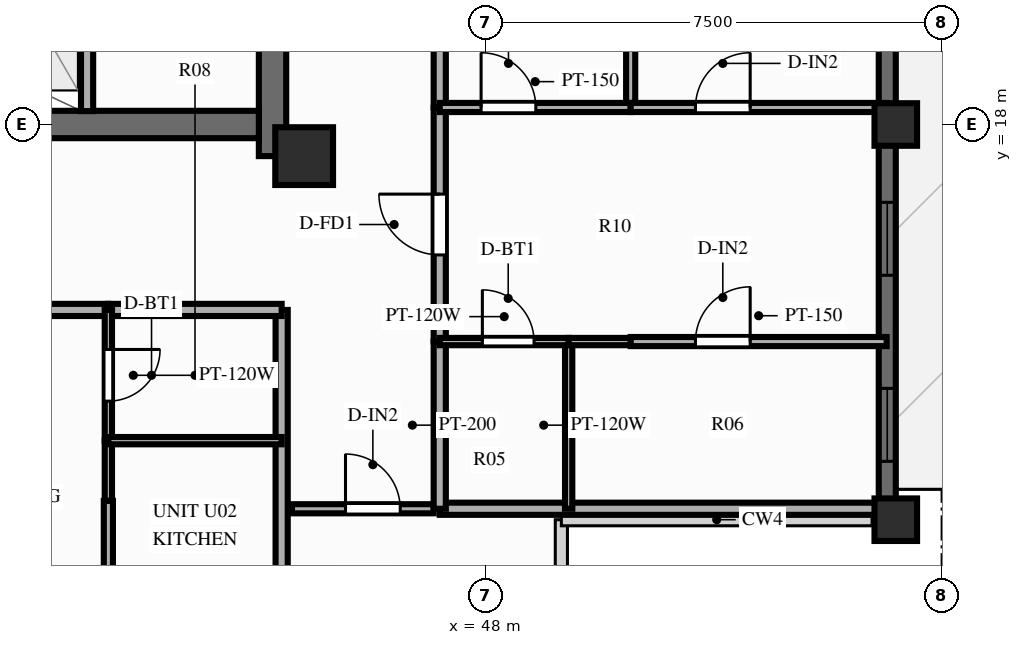
"""IFC4 building model, lengths in metres.
Left out: names, types, materials, properties, quantities, classifications, styles, units other than length and angle.
Written with IfcOpenShell. Run it as: python <this file> out.ifc"""

import sys

from ifc_helpers import new_model, si_unit, direction, frame, frame_2d, origin, origin_2d, place, context, subcontext, project, spatial, rectangle, extrude, source, transform, mapped, element, fill, save


model = new_model("IFC4")
c1 = context("Model", 3, precision=1e-05, world=origin(), true_north=direction((0.0, 1.0)))
c2 = subcontext(c1, "Body", "Model", "MODEL_VIEW")
j1 = project(units=[si_unit("LENGTHUNIT", "METRE"), si_unit("PLANEANGLEUNIT", "RADIAN")], contexts=[c1])
p1 = place(None, origin())
s1 = spatial("IfcSite", under=j1, at=p1, CompositionType="ELEMENT")
p2 = place(p1, origin())
s2 = spatial("IfcBuilding", under=s1, at=p2, CompositionType="ELEMENT")
p3 = place(p2, frame((0.0, 0.0, 236.1)))
s3 = spatial("IfcBuildingStorey", under=s2, at=p3, CompositionType="ELEMENT", Elevation=236.1)
p4 = place(p3, frame((44.5, 17.48, 0.0), z_axis=(0.0, 0.0, 1.0), x_axis=(0.0, 1.0, 0.0)))
e1 = element("IfcWall", 1, at=p4, inside=s3, PredefinedType="SHEAR", context=c2, shape_type="SweptSolid", body=[
    extrude(rectangle(XDim=19.04, YDim=0.45, at=frame_2d((9.52, 0.0))), origin(), (0.0, 0.0, 1.0), 3.9),
])
p5 = place(p4, frame((12.67, 0.0, 0.0), z_axis=(0.0, 0.0, 1.0), x_axis=(-1.0, 0.0, 0.0)))
e2 = element("IfcOpeningElement", 2, at=p5, cuts=e1, PredefinedType="OPENING", context=c2, shape_type="SweptSolid", body=[
    extrude(rectangle(XDim=1.1, YDim=2.15, at=frame_2d((0.55, 1.075))), frame((0.0, 0.237, 0.0), z_axis=(0.0, -1.0, 0.0), x_axis=(1.0, 0.0, 0.0)), (0.0, 0.0, 1.0), 0.474),
])
p6 = place(p3, frame((31.725, 18.0, 0.0), z_axis=(0.0, 0.0, 1.0), x_axis=(1.0, 0.0, 0.0)))
e3 = element("IfcWall", 3, at=p6, inside=s3, PredefinedType="SHEAR", context=c2, shape_type="SweptSolid", body=[
    extrude(rectangle(XDim=12.55, YDim=0.45, at=frame_2d((6.275, 0.0))), origin(), (0.0, 0.0, 1.0), 3.9),
])
m1 = source(origin(), c2, "Body", "SweptSolid", [
    extrude(rectangle(XDim=0.95, YDim=0.95, at=origin_2d()), origin(), (0.0, 0.0, 1.0), 3.9),
])
p7 = place(p3, frame((45.02, 17.48, 0.0), z_axis=(0.0, 0.0, 1.0), x_axis=(1.0, 0.0, 0.0)))
e4 = element("IfcColumn", 4, at=p7, inside=s3, PredefinedType="COLUMN", context=c2, shape_type="MappedRepresentation", body=[
    mapped(m1, transform((0.0, 0.0, 0.0), scale=1.0)),
])
m2 = source(origin(), c2, "Body", "SweptSolid", [
    extrude(rectangle(XDim=0.7, YDim=0.7, at=origin_2d()), origin(), (0.0, 0.0, 1.0), 3.9),
])
for number, where, z_axis, x_axis in (
    (5, (54.75, 11.5, 0.0), (0.0, 0.0, 1.0), (1.0, 0.0, 0.0)),
    (6, (54.75, 18.0, 0.0), (0.0, 0.0, 1.0), (1.0, 0.0, 0.0)),
):
    element("IfcColumn", number, at=place(p3, frame(where, z_axis=z_axis, x_axis=x_axis)), inside=s3, PredefinedType="COLUMN", context=c2, shape_type="MappedRepresentation", body=[
        mapped(m2, transform((0.0, 0.0, 0.0), scale=1.0)),
    ])
p8 = place(p3, frame((54.61, 11.5, 0.0), z_axis=(0.0, 0.0, 1.0), x_axis=(0.0, 1.0, 0.0)))
e7 = element("IfcWall", 7, at=p8, inside=s3, PredefinedType="SOLIDWALL", context=c2, shape_type="SweptSolid", body=[
    extrude(rectangle(XDim=31.0, YDim=0.28, at=frame_2d((15.5, 0.0))), origin(), (0.0, 0.0, 1.0), 2.44),
])
p9 = place(p8, frame((0.96, 0.0, 0.25)))
e8 = element("IfcOpeningElement", 8, at=p9, cuts=e7, PredefinedType="OPENING", context=c2, shape_type="SweptSolid", body=[
    extrude(rectangle(XDim=1.2, YDim=1.5, at=frame_2d((0.6, 0.75))), frame((0.0, 0.152, 0.0), z_axis=(0.0, -1.0, 0.0), x_axis=(1.0, 0.0, 0.0)), (0.0, 0.0, 1.0), 0.304),
])
p10 = place(p8, frame((4.02, 0.0, 0.25)))
e9 = element("IfcOpeningElement", 9, at=p10, cuts=e7, PredefinedType="OPENING", context=c2, shape_type="SweptSolid", body=[
    extrude(rectangle(XDim=1.2, YDim=1.5, at=frame_2d((0.6, 0.75))), frame((0.0, 0.152, 0.0), z_axis=(0.0, -1.0, 0.0), x_axis=(1.0, 0.0, 0.0)), (0.0, 0.0, 1.0), 0.304),
])
p11 = place(p8, frame((8.089, 0.0, 0.25)))
e10 = element("IfcOpeningElement", 10, at=p11, cuts=e7, PredefinedType="OPENING", context=c2, shape_type="SweptSolid", body=[
    extrude(rectangle(XDim=1.2, YDim=1.5, at=frame_2d((0.6, 0.75))), frame((0.0, 0.152, 0.0), z_axis=(0.0, -1.0, 0.0), x_axis=(1.0, 0.0, 0.0)), (0.0, 0.0, 1.0), 0.304),
])
p12 = place(p8, frame((11.373, 0.0, 0.25)))
e11 = element("IfcOpeningElement", 11, at=p12, cuts=e7, PredefinedType="OPENING", context=c2, shape_type="SweptSolid", body=[
    extrude(rectangle(XDim=1.2, YDim=1.5, at=frame_2d((0.6, 0.75))), frame((0.0, 0.152, 0.0), z_axis=(0.0, -1.0, 0.0), x_axis=(1.0, 0.0, 0.0)), (0.0, 0.0, 1.0), 0.304),
])
p13 = place(p8, frame((15.907, 0.0, 0.0), z_axis=(0.0, 0.0, 1.0), x_axis=(-1.0, 0.0, 0.0)))
e12 = element("IfcOpeningElement", 12, at=p13, cuts=e7, PredefinedType="OPENING", context=c2, shape_type="SweptSolid", body=[
    extrude(rectangle(XDim=1.6, YDim=2.15, at=frame_2d((0.8, 1.075))), frame((0.0, 0.152, 0.0), z_axis=(0.0, -1.0, 0.0), x_axis=(1.0, 0.0, 0.0)), (0.0, 0.0, 1.0), 0.304),
])
p14 = place(p8, frame((18.188, 0.0, 0.25)))
e13 = element("IfcOpeningElement", 13, at=p14, cuts=e7, PredefinedType="OPENING", context=c2, shape_type="SweptSolid", body=[
    extrude(rectangle(XDim=1.2, YDim=1.5, at=frame_2d((0.6, 0.75))), frame((0.0, 0.152, 0.0), z_axis=(0.0, -1.0, 0.0), x_axis=(1.0, 0.0, 0.0)), (0.0, 0.0, 1.0), 0.304),
])
p15 = place(p8, frame((21.484, 0.0, 0.25)))
e14 = element("IfcOpeningElement", 14, at=p15, cuts=e7, PredefinedType="OPENING", context=c2, shape_type="SweptSolid", body=[
    extrude(rectangle(XDim=1.2, YDim=1.5, at=frame_2d((0.6, 0.75))), frame((0.0, 0.152, 0.0), z_axis=(0.0, -1.0, 0.0), x_axis=(1.0, 0.0, 0.0)), (0.0, 0.0, 1.0), 0.304),
])
p16 = place(p8, frame((25.234, 0.0, 0.25)))
e15 = element("IfcOpeningElement", 15, at=p16, cuts=e7, PredefinedType="OPENING", context=c2, shape_type="SweptSolid", body=[
    extrude(rectangle(XDim=1.2, YDim=1.5, at=frame_2d((0.6, 0.75))), frame((0.0, 0.152, 0.0), z_axis=(0.0, -1.0, 0.0), x_axis=(1.0, 0.0, 0.0)), (0.0, 0.0, 1.0), 0.304),
])
p17 = place(p8, frame((28.294, 0.0, 0.25)))
e16 = element("IfcOpeningElement", 16, at=p17, cuts=e7, PredefinedType="OPENING", context=c2, shape_type="SweptSolid", body=[
    extrude(rectangle(XDim=1.2, YDim=1.5, at=frame_2d((0.6, 0.75))), frame((0.0, 0.152, 0.0), z_axis=(0.0, -1.0, 0.0), x_axis=(1.0, 0.0, 0.0)), (0.0, 0.0, 1.0), 0.304),
])
p18 = place(p3, frame((41.45, 18.22, 0.0), z_axis=(0.0, 0.0, 1.0), x_axis=(0.0, 1.0, 0.0)))
e17 = element("IfcWall", 17, at=p18, inside=s3, PredefinedType="PARTITIONING", context=c2, shape_type="SweptSolid", body=[
    extrude(rectangle(XDim=2.96, YDim=0.2, at=frame_2d((1.48, 0.0))), origin(), (0.0, 0.0, 1.0), 3.56),
])
p19 = place(p3, frame((44.82, 11.68, 0.0), z_axis=(0.0, 0.0, 1.0), x_axis=(1.0, 0.0, 0.0)))
e18 = element("IfcWall", 18, at=p19, inside=s3, PredefinedType="PARTITIONING", context=c2, shape_type="SweptSolid", body=[
    extrude(rectangle(XDim=2.33, YDim=0.15, at=frame_2d((1.165, 0.0))), origin(), (0.0, 0.0, 1.0), 2.24),
])
p20 = place(p19, frame((0.88, 0.0, 0.0)))
e19 = element("IfcOpeningElement", 19, at=p20, cuts=e18, PredefinedType="OPENING", context=c2, shape_type="SweptSolid", body=[
    extrude(rectangle(XDim=0.9, YDim=2.1, at=frame_2d((0.45, 1.05))), frame((0.0, 0.087, 0.0), z_axis=(0.0, -1.0, 0.0), x_axis=(1.0, 0.0, 0.0)), (0.0, 0.0, 1.0), 0.174),
])
p21 = place(p3, frame((44.65, 14.95, 0.0), z_axis=(0.0, 0.0, 1.0), x_axis=(0.0, -1.0, 0.0)))
e20 = element("IfcWall", 20, at=p21, inside=s3, PredefinedType="PARTITIONING", context=c2, shape_type="SweptSolid", body=[
    extrude(rectangle(XDim=8.8, YDim=0.2, at=frame_2d((4.4, 0.0))), origin(), (0.0, 0.0, 1.0), 2.44),
])
p22 = place(p3, frame((38.0, 14.95, 0.0), z_axis=(0.0, 0.0, 1.0), x_axis=(1.0, 0.0, 0.0)))
e21 = element("IfcWall", 21, at=p22, inside=s3, PredefinedType="PARTITIONING", context=c2, shape_type="SweptSolid", body=[
    extrude(rectangle(XDim=3.8, YDim=0.2, at=frame_2d((1.9, 0.0))), origin(), (0.0, 0.0, 1.0), 3.56),
])
p23 = place(p22, frame((1.4, 0.0, 0.0)))
e22 = element("IfcOpeningElement", 22, at=p23, cuts=e21, PredefinedType="OPENING", context=c2, shape_type="SweptSolid", body=[
    extrude(rectangle(XDim=1.0, YDim=2.15, at=frame_2d((0.5, 1.075))), frame((0.0, 0.112, 0.0), z_axis=(0.0, -1.0, 0.0), x_axis=(1.0, 0.0, 0.0)), (0.0, 0.0, 1.0), 0.224),
])
p24 = place(p3, frame((41.8, 14.95, 0.0), z_axis=(0.0, 0.0, 1.0), x_axis=(1.0, 0.0, 0.0)))
e23 = element("IfcWall", 23, at=p24, inside=s3, PredefinedType="PARTITIONING", context=c2, shape_type="SweptSolid", body=[
    extrude(rectangle(XDim=2.85, YDim=0.2, at=frame_2d((1.425, 0.0))), origin(), (0.0, 0.0, 1.0), 3.56),
])
p25 = place(p3, frame((41.8, 14.95, 0.0), z_axis=(0.0, 0.0, 1.0), x_axis=(0.0, -1.0, 0.0)))
e24 = element("IfcWall", 24, at=p25, inside=s3, PredefinedType="PARTITIONING", context=c2, shape_type="SweptSolid", body=[
    extrude(rectangle(XDim=2.15, YDim=0.12, at=frame_2d((1.075, 0.0))), origin(), (0.0, 0.0, 1.0), 3.56),
])
p26 = place(p25, frame((0.65, 0.0, 0.0)))
e25 = element("IfcOpeningElement", 25, at=p26, cuts=e24, PredefinedType="OPENING", context=c2, shape_type="SweptSolid", body=[
    extrude(rectangle(XDim=0.85, YDim=2.05, at=frame_2d((0.425, 1.025))), frame((0.0, 0.072, 0.0), z_axis=(0.0, -1.0, 0.0), x_axis=(1.0, 0.0, 0.0)), (0.0, 0.0, 1.0), 0.144),
])
p27 = place(p3, frame((41.8, 12.8, 0.0), z_axis=(0.0, 0.0, 1.0), x_axis=(0.0, -1.0, 0.0)))
e26 = element("IfcWall", 26, at=p27, inside=s3, PredefinedType="PARTITIONING", context=c2, shape_type="SweptSolid", body=[
    extrude(rectangle(XDim=0.99, YDim=0.12, at=frame_2d((0.495, 0.0))), origin(), (0.0, 0.0, 1.0), 3.56),
])
p28 = place(p3, frame((41.8, 12.8, 0.0), z_axis=(0.0, 0.0, 1.0), x_axis=(1.0, 0.0, 0.0)))
e27 = element("IfcWall", 27, at=p28, inside=s3, PredefinedType="PARTITIONING", context=c2, shape_type="SweptSolid", body=[
    extrude(rectangle(XDim=2.85, YDim=0.12, at=frame_2d((1.425, 0.0))), origin(), (0.0, 0.0, 1.0), 3.56),
])
p29 = place(p3, frame((41.8, 11.81, 0.0), z_axis=(0.0, 0.0, 1.0), x_axis=(0.0, -1.0, 0.0)))
e28 = element("IfcWall", 28, at=p29, inside=s3, PredefinedType="PARTITIONING", context=c2, shape_type="SweptSolid", body=[
    extrude(rectangle(XDim=5.66, YDim=0.15, at=frame_2d((2.83, 0.0))), origin(), (0.0, 0.0, 1.0), 3.56),
])
p30 = place(p29, frame((2.202, 0.0, 0.0)))
e29 = element("IfcOpeningElement", 29, at=p30, cuts=e28, PredefinedType="OPENING", context=c2, shape_type="SweptSolid", body=[
    extrude(rectangle(XDim=0.9, YDim=2.1, at=frame_2d((0.45, 1.05))), frame((0.0, 0.087, 0.0), z_axis=(0.0, -1.0, 0.0), x_axis=(1.0, 0.0, 0.0)), (0.0, 0.0, 1.0), 0.174),
])
p31 = place(p3, frame((47.25, 11.68, 0.0), z_axis=(0.0, 0.0, 1.0), x_axis=(1.0, 0.0, 0.0)))
e30 = element("IfcWall", 30, at=p31, inside=s3, PredefinedType="PARTITIONING", context=c2, shape_type="SweptSolid", body=[
    extrude(rectangle(XDim=7.35, YDim=0.2, at=frame_2d((3.675, 0.0))), origin(), (0.0, 0.0, 1.0), 2.24),
])
p32 = place(p3, frame((47.25, 11.68, 0.0), z_axis=(0.0, 0.0, 1.0), x_axis=(0.0, 1.0, 0.0)))
e31 = element("IfcWall", 31, at=p32, inside=s3, PredefinedType="PARTITIONING", context=c2, shape_type="SweptSolid", body=[
    extrude(rectangle(XDim=2.75, YDim=0.2, at=frame_2d((1.375, 0.0))), origin(), (0.0, 0.0, 1.0), 2.24),
])
p33 = place(p3, frame((47.25, 14.43, 0.0), z_axis=(0.0, 0.0, 1.0), x_axis=(0.0, 1.0, 0.0)))
e32 = element("IfcWall", 32, at=p33, inside=s3, PredefinedType="PARTITIONING", context=c2, shape_type="SweptSolid", body=[
    extrude(rectangle(XDim=3.85, YDim=0.2, at=frame_2d((1.925, 0.0))), origin(), (0.0, 0.0, 1.0), 2.24),
])
p34 = place(p33, frame((1.425, 0.0, 0.0)))
e33 = element("IfcOpeningElement", 33, at=p34, cuts=e32, PredefinedType="OPENING", context=c2, shape_type="SweptSolid", body=[
    extrude(rectangle(XDim=1.0, YDim=2.15, at=frame_2d((0.5, 1.075))), frame((0.0, 0.112, 0.0), z_axis=(0.0, -1.0, 0.0), x_axis=(1.0, 0.0, 0.0)), (0.0, 0.0, 1.0), 0.224),
])
p35 = place(p3, frame((47.25, 18.28, 0.0), z_axis=(0.0, 0.0, 1.0), x_axis=(0.0, 1.0, 0.0)))
e34 = element("IfcWall", 34, at=p35, inside=s3, PredefinedType="PARTITIONING", context=c2, shape_type="SweptSolid", body=[
    extrude(rectangle(XDim=3.818, YDim=0.2, at=frame_2d((1.909, 0.0))), origin(), (0.0, 0.0, 1.0), 3.56),
])
p36 = place(p3, frame((49.37, 11.68, 0.0), z_axis=(0.0, 0.0, 1.0), x_axis=(0.0, 1.0, 0.0)))
e35 = element("IfcWall", 35, at=p36, inside=s3, PredefinedType="PARTITIONING", context=c2, shape_type="SweptSolid", body=[
    extrude(rectangle(XDim=2.75, YDim=0.12, at=frame_2d((1.375, 0.0))), origin(), (0.0, 0.0, 1.0), 3.56),
])
p37 = place(p3, frame((50.39, 18.28, 0.0), z_axis=(0.0, 0.0, 1.0), x_axis=(0.0, 1.0, 0.0)))
e36 = element("IfcWall", 36, at=p37, inside=s3, PredefinedType="PARTITIONING", context=c2, shape_type="SweptSolid", body=[
    extrude(rectangle(XDim=3.818, YDim=0.15, at=frame_2d((1.909, 0.0))), origin(), (0.0, 0.0, 1.0), 3.39),
])
p38 = place(p3, frame((47.25, 14.43, 0.0), z_axis=(0.0, 0.0, 1.0), x_axis=(1.0, 0.0, 0.0)))
e37 = element("IfcWall", 37, at=p38, inside=s3, PredefinedType="PARTITIONING", context=c2, shape_type="SweptSolid", body=[
    extrude(rectangle(XDim=2.12, YDim=0.12, at=frame_2d((1.06, 0.0))), origin(), (0.0, 0.0, 1.0), 3.56),
])
p39 = place(p38, frame((0.701, 0.0, 0.0)))
e38 = element("IfcOpeningElement", 38, at=p39, cuts=e37, PredefinedType="OPENING", context=c2, shape_type="SweptSolid", body=[
    extrude(rectangle(XDim=0.85, YDim=2.05, at=frame_2d((0.425, 1.025))), frame((0.0, 0.072, 0.0), z_axis=(0.0, -1.0, 0.0), x_axis=(1.0, 0.0, 0.0)), (0.0, 0.0, 1.0), 0.144),
])
p40 = place(p3, frame((49.37, 14.43, 0.0), z_axis=(0.0, 0.0, 1.0), x_axis=(1.0, 0.0, 0.0)))
e39 = element("IfcWall", 39, at=p40, inside=s3, PredefinedType="PARTITIONING", context=c2, shape_type="SweptSolid", body=[
    extrude(rectangle(XDim=1.02, YDim=0.12, at=frame_2d((0.51, 0.0))), origin(), (0.0, 0.0, 1.0), 3.56),
])
p41 = place(p3, frame((50.39, 14.43, 0.0), z_axis=(0.0, 0.0, 1.0), x_axis=(1.0, 0.0, 0.0)))
e40 = element("IfcWall", 40, at=p41, inside=s3, PredefinedType="PARTITIONING", context=c2, shape_type="SweptSolid", body=[
    extrude(rectangle(XDim=4.21, YDim=0.15, at=frame_2d((2.105, 0.0))), origin(), (0.0, 0.0, 1.0), 3.56),
])
p42 = place(p41, frame((1.065, 0.0, 0.0)))
e41 = element("IfcOpeningElement", 41, at=p42, cuts=e40, PredefinedType="OPENING", context=c2, shape_type="SweptSolid", body=[
    extrude(rectangle(XDim=0.9, YDim=2.1, at=frame_2d((0.45, 1.05))), frame((0.0, 0.087, 0.0), z_axis=(0.0, -1.0, 0.0), x_axis=(1.0, 0.0, 0.0)), (0.0, 0.0, 1.0), 0.174),
])
p43 = place(p3, frame((47.25, 18.28, 0.0), z_axis=(0.0, 0.0, 1.0), x_axis=(1.0, 0.0, 0.0)))
e42 = element("IfcWall", 42, at=p43, inside=s3, PredefinedType="PARTITIONING", context=c2, shape_type="SweptSolid", body=[
    extrude(rectangle(XDim=3.14, YDim=0.15, at=frame_2d((1.57, 0.0))), origin(), (0.0, 0.0, 1.0), 3.56),
])
p44 = place(p43, frame((0.68, 0.0, 0.0)))
e43 = element("IfcOpeningElement", 43, at=p44, cuts=e42, PredefinedType="OPENING", context=c2, shape_type="SweptSolid", body=[
    extrude(rectangle(XDim=0.9, YDim=2.1, at=frame_2d((0.45, 1.05))), frame((0.0, 0.087, 0.0), z_axis=(0.0, -1.0, 0.0), x_axis=(1.0, 0.0, 0.0)), (0.0, 0.0, 1.0), 0.174),
])
p45 = place(p3, frame((50.39, 18.28, 0.0), z_axis=(0.0, 0.0, 1.0), x_axis=(1.0, 0.0, 0.0)))
e44 = element("IfcWall", 44, at=p45, inside=s3, PredefinedType="PARTITIONING", context=c2, shape_type="SweptSolid", body=[
    extrude(rectangle(XDim=4.21, YDim=0.15, at=frame_2d((2.105, 0.0))), origin(), (0.0, 0.0, 1.0), 3.56),
])
p46 = place(p45, frame((1.065, 0.0, 0.0)))
e45 = element("IfcOpeningElement", 45, at=p46, cuts=e44, PredefinedType="OPENING", context=c2, shape_type="SweptSolid", body=[
    extrude(rectangle(XDim=0.9, YDim=2.1, at=frame_2d((0.45, 1.05))), frame((0.0, 0.087, 0.0), z_axis=(0.0, -1.0, 0.0), x_axis=(1.0, 0.0, 0.0)), (0.0, 0.0, 1.0), 0.174),
])
m3 = source(origin(), c2, "Body", "SweptSolid", [
    extrude(rectangle(XDim=1.2, YDim=1.5, at=frame_2d((0.6, 0.75))), frame((0.0, 0.03, 0.0), z_axis=(0.0, -1.0, 0.0), x_axis=(1.0, 0.0, 0.0)), (0.0, 0.0, 1.0), 0.06),
])
p47 = place(p9, origin())
e46 = element("IfcWindow", 46, at=p47, inside=s3, PartitioningType="SINGLE_PANEL", PredefinedType="WINDOW", context=c2, shape_type="MappedRepresentation", body=[
    mapped(m3, transform((0.0, 0.0, 0.0), scale=1.0)),
])
fill(e8, e46)
p48 = place(p10, origin())
e47 = element("IfcWindow", 47, at=p48, inside=s3, PartitioningType="SINGLE_PANEL", PredefinedType="WINDOW", context=c2, shape_type="MappedRepresentation", body=[
    mapped(m3, transform((0.0, 0.0, 0.0), scale=1.0)),
])
fill(e9, e47)
m4 = source(origin(), c2, "Body", "SweptSolid", [
    extrude(rectangle(XDim=0.9, YDim=2.1, at=frame_2d((0.45, 1.05))), frame((0.0, 0.025, 0.0), z_axis=(0.0, -1.0, 0.0), x_axis=(1.0, 0.0, 0.0)), (0.0, 0.0, 1.0), 0.05),
])
p49 = place(p20, origin())
e48 = element("IfcDoor", 48, at=p49, inside=s3, OperationType="SINGLE_SWING_LEFT", PredefinedType="DOOR", context=c2, shape_type="MappedRepresentation", body=[
    mapped(m4, transform((0.0, 0.0, 0.0), scale=1.0)),
])
fill(e19, e48)
m5 = source(origin(), c2, "Body", "SweptSolid", [
    extrude(rectangle(XDim=0.85, YDim=2.05, at=frame_2d((0.425, 1.025))), frame((0.0, 0.025, 0.0), z_axis=(0.0, -1.0, 0.0), x_axis=(1.0, 0.0, 0.0)), (0.0, 0.0, 1.0), 0.05),
])
p50 = place(p26, origin())
e49 = element("IfcDoor", 49, at=p50, inside=s3, OperationType="SINGLE_SWING_LEFT", PredefinedType="DOOR", context=c2, shape_type="MappedRepresentation", body=[
    mapped(m5, transform((0.0, 0.0, 0.0), scale=1.0)),
])
fill(e25, e49)
m6 = source(origin(), c2, "Body", "SweptSolid", [
    extrude(rectangle(XDim=1.0, YDim=2.15, at=frame_2d((0.5, 1.075))), frame((0.0, 0.025, 0.0), z_axis=(0.0, -1.0, 0.0), x_axis=(1.0, 0.0, 0.0)), (0.0, 0.0, 1.0), 0.05),
])
p51 = place(p34, origin())
e50 = element("IfcDoor", 50, at=p51, inside=s3, OperationType="SINGLE_SWING_RIGHT", PredefinedType="DOOR", context=c2, shape_type="MappedRepresentation", body=[
    mapped(m6, transform((0.0, 0.0, 0.0), scale=1.0)),
])
fill(e33, e50)
p52 = place(p39, origin())
e51 = element("IfcDoor", 51, at=p52, inside=s3, OperationType="SINGLE_SWING_LEFT", PredefinedType="DOOR", context=c2, shape_type="MappedRepresentation", body=[
    mapped(m5, transform((0.0, 0.0, 0.0), scale=1.0)),
])
fill(e38, e51)
p53 = place(p42, origin())
e52 = element("IfcDoor", 52, at=p53, inside=s3, OperationType="SINGLE_SWING_RIGHT", PredefinedType="DOOR", context=c2, shape_type="MappedRepresentation", body=[
    mapped(m4, transform((0.0, 0.0, 0.0), scale=1.0)),
])
fill(e41, e52)
p54 = place(p44, origin())
e53 = element("IfcDoor", 53, at=p54, inside=s3, OperationType="SINGLE_SWING_LEFT", PredefinedType="DOOR", context=c2, shape_type="MappedRepresentation", body=[
    mapped(m4, transform((0.0, 0.0, 0.0), scale=1.0)),
])
fill(e43, e53)
p55 = place(p46, origin())
e54 = element("IfcDoor", 54, at=p55, inside=s3, OperationType="SINGLE_SWING_RIGHT", PredefinedType="DOOR", context=c2, shape_type="MappedRepresentation", body=[
    mapped(m4, transform((0.0, 0.0, 0.0), scale=1.0)),
])
fill(e45, e54)
save(model, sys.argv[1])
